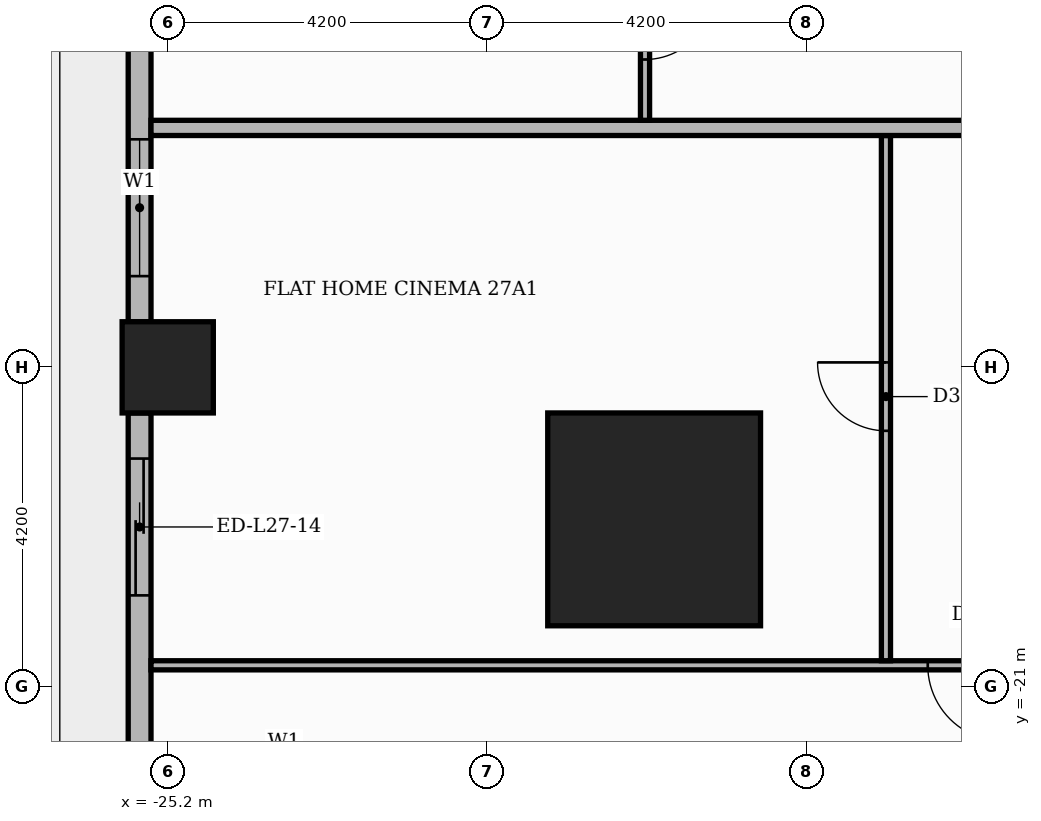
"""IFC4 building model, lengths in metres.
Left out: names, types, materials, properties, quantities, classifications, styles, units other than length and angle.
Written with IfcOpenShell. Run it as: python <this file> out.ifc"""

import sys

from ifc_helpers import new_model, si_unit, direction, frame, frame_2d, origin, origin_2d, place, context, subcontext, project, spatial, rectangle, extrude, element, fill, save


model = new_model("IFC4")
c1 = context("Model", 3, precision=1e-05, world=origin(), true_north=direction((0.0, 1.0)))
c2 = subcontext(c1, "Body", "Model", "MODEL_VIEW")
j1 = project(units=[si_unit("LENGTHUNIT", "METRE"), si_unit("PLANEANGLEUNIT", "RADIAN")], contexts=[c1])
p1 = place(None, origin())
s1 = spatial("IfcSite", under=j1, at=p1, CompositionType="ELEMENT")
p2 = place(p1, origin())
s2 = spatial("IfcBuilding", under=s1, at=p2, CompositionType="ELEMENT")
p3 = place(p2, frame((0.0, 0.0, 114.3)))
s3 = spatial("IfcBuildingStorey", under=s2, at=p3, CompositionType="ELEMENT", Elevation=114.3)
p4 = place(p3, frame((-18.8, -18.8, 0.0), z_axis=(0.0, 0.0, 1.0), x_axis=(1.0, 0.0, 0.0)))
e1 = element("IfcColumn", 1, at=p4, inside=s3, PredefinedType="COLUMN", context=c2, shape_type="SweptSolid", body=[
    extrude(rectangle(XDim=2.8, YDim=2.8, at=origin_2d()), origin(), (0.0, 0.0, 1.0), 3.9),
])
p5 = place(p3, frame((-25.2, -16.8, 0.0), z_axis=(0.0, 0.0, 1.0), x_axis=(1.0, 0.0, 0.0)))
e2 = element("IfcColumn", 2, at=p5, inside=s3, PredefinedType="COLUMN", context=c2, shape_type="SweptSolid", body=[
    extrude(rectangle(XDim=1.2, YDim=1.2, at=origin_2d()), origin(), (0.0, 0.0, 1.0), 3.9),
])
p6 = place(p3, frame((-25.57, -11.85, 0.0), z_axis=(0.0, 0.0, 1.0), x_axis=(0.0, -1.0, 0.0)))
e3 = element("IfcWall", 3, at=p6, inside=s3, PredefinedType="STANDARD", context=c2, shape_type="SweptSolid", body=[
    extrude(rectangle(XDim=4.35, YDim=0.3, at=frame_2d((2.175, 0.0))), origin(), (0.0, 0.0, 1.0), 3.48),
])
p7 = place(p6, frame((1.95, 0.0, 0.9)))
e4 = element("IfcOpeningElement", 4, at=p7, cuts=e3, PredefinedType="OPENING", context=c2, shape_type="SweptSolid", body=[
    extrude(rectangle(XDim=1.8, YDim=2.1, at=frame_2d((0.9, 1.05))), frame((0.0, 0.16, 0.0), z_axis=(0.0, -1.0, 0.0), x_axis=(1.0, 0.0, 0.0)), (0.0, 0.0, 1.0), 0.32),
])
p8 = place(p3, frame((-25.57, -17.4, 0.0), z_axis=(0.0, 0.0, 1.0), x_axis=(0.0, -1.0, 0.0)))
e5 = element("IfcWall", 5, at=p8, inside=s3, PredefinedType="STANDARD", context=c2, shape_type="SweptSolid", body=[
    extrude(rectangle(XDim=4.82, YDim=0.3, at=frame_2d((2.41, 0.0))), origin(), (0.0, 0.0, 1.0), 3.48),
])
p9 = place(p8, frame((0.6, 0.0, 0.0)))
e6 = element("IfcOpeningElement", 6, at=p9, cuts=e5, PredefinedType="OPENING", context=c2, shape_type="SweptSolid", body=[
    extrude(rectangle(XDim=1.8, YDim=2.4, at=frame_2d((0.9, 1.2))), frame((0.0, 0.16, 0.0), z_axis=(0.0, -1.0, 0.0), x_axis=(1.0, 0.0, 0.0)), (0.0, 0.0, 1.0), 0.32),
])
p10 = place(p3, frame((-25.42, -20.72, 0.0), z_axis=(0.0, 0.0, 1.0), x_axis=(1.0, 0.0, 0.0)))
e7 = element("IfcWall", 7, at=p10, inside=s3, PredefinedType="PARTITIONING", context=c2, shape_type="SweptSolid", body=[
    extrude(rectangle(XDim=38.97, YDim=0.12, at=frame_2d((19.485, 0.0))), origin(), (0.0, 0.0, 1.0), 3.48),
])
p11 = place(p10, frame((10.22, 0.0, 0.0)))
e8 = element("IfcOpeningElement", 8, at=p11, cuts=e7, PredefinedType="OPENING", context=c2, shape_type="SweptSolid", body=[
    extrude(rectangle(XDim=1.0, YDim=2.1, at=frame_2d((0.5, 1.05))), frame((0.0, 0.07, 0.0), z_axis=(0.0, -1.0, 0.0), x_axis=(1.0, 0.0, 0.0)), (0.0, 0.0, 1.0), 0.14),
])
p12 = place(p10, frame((14.47, 0.0, 0.0)))
e9 = element("IfcOpeningElement", 9, at=p12, cuts=e7, PredefinedType="OPENING", context=c2, shape_type="SweptSolid", body=[
    extrude(rectangle(XDim=0.9, YDim=2.1, at=frame_2d((0.45, 1.05))), frame((0.0, 0.07, 0.0), z_axis=(0.0, -1.0, 0.0), x_axis=(1.0, 0.0, 0.0)), (0.0, 0.0, 1.0), 0.14),
])
p13 = place(p10, frame((23.92, 0.0, 0.0)))
e10 = element("IfcOpeningElement", 10, at=p13, cuts=e7, PredefinedType="OPENING", context=c2, shape_type="SweptSolid", body=[
    extrude(rectangle(XDim=0.9, YDim=2.1, at=frame_2d((0.45, 1.05))), frame((0.0, 0.07, 0.0), z_axis=(0.0, -1.0, 0.0), x_axis=(1.0, 0.0, 0.0)), (0.0, 0.0, 1.0), 0.14),
])
p14 = place(p10, frame((28.12, 0.0, 0.0)))
e11 = element("IfcOpeningElement", 11, at=p14, cuts=e7, PredefinedType="OPENING", context=c2, shape_type="SweptSolid", body=[
    extrude(rectangle(XDim=0.9, YDim=2.1, at=frame_2d((0.45, 1.05))), frame((0.0, 0.07, 0.0), z_axis=(0.0, -1.0, 0.0), x_axis=(1.0, 0.0, 0.0)), (0.0, 0.0, 1.0), 0.14),
])
p15 = place(p10, frame((34.42, 0.0, 0.0)))
e12 = element("IfcOpeningElement", 12, at=p15, cuts=e7, PredefinedType="OPENING", context=c2, shape_type="SweptSolid", body=[
    extrude(rectangle(XDim=0.9, YDim=2.1, at=frame_2d((0.45, 1.05))), frame((0.0, 0.07, 0.0), z_axis=(0.0, -1.0, 0.0), x_axis=(1.0, 0.0, 0.0)), (0.0, 0.0, 1.0), 0.14),
])
p16 = place(p3, frame((-15.75, -20.66, 0.0), z_axis=(0.0, 0.0, 1.0), x_axis=(0.0, 1.0, 0.0)))
e13 = element("IfcWall", 13, at=p16, inside=s3, PredefinedType="PARTITIONING", context=c2, shape_type="SweptSolid", body=[
    extrude(rectangle(XDim=6.91, YDim=0.12, at=frame_2d((3.455, 0.0))), origin(), (0.0, 0.0, 1.0), 3.48),
])
p17 = place(p16, frame((3.025, 0.0, 0.0)))
e14 = element("IfcOpeningElement", 14, at=p17, cuts=e13, PredefinedType="OPENING", context=c2, shape_type="SweptSolid", body=[
    extrude(rectangle(XDim=0.9, YDim=2.1, at=frame_2d((0.45, 1.05))), frame((0.0, 0.07, 0.0), z_axis=(0.0, -1.0, 0.0), x_axis=(1.0, 0.0, 0.0)), (0.0, 0.0, 1.0), 0.14),
])
p18 = place(p3, frame((-25.42, -13.65, 0.0), z_axis=(0.0, 0.0, 1.0), x_axis=(1.0, 0.0, 0.0)))
e15 = element("IfcWall", 15, at=p18, inside=s3, PredefinedType="PARTITIONING", context=c2, shape_type="SweptSolid", body=[
    extrude(rectangle(XDim=39.07, YDim=0.2, at=frame_2d((19.535, 0.0))), origin(), (0.0, 0.0, 1.0), 3.48),
])
p19 = place(p18, frame((13.32, 0.0, 0.0)))
e16 = element("IfcOpeningElement", 16, at=p19, cuts=e15, PredefinedType="OPENING", context=c2, shape_type="SweptSolid", body=[
    extrude(rectangle(XDim=1.1, YDim=2.4, at=frame_2d((0.55, 1.2))), frame((0.0, 0.11, 0.0), z_axis=(0.0, -1.0, 0.0), x_axis=(1.0, 0.0, 0.0)), (0.0, 0.0, 1.0), 0.22),
])
p20 = place(p3, frame((-18.92, -13.55, 0.0), z_axis=(0.0, 0.0, 1.0), x_axis=(0.0, 1.0, 0.0)))
e17 = element("IfcWall", 17, at=p20, inside=s3, PredefinedType="PARTITIONING", context=c2, shape_type="SweptSolid", body=[
    extrude(rectangle(XDim=2.54, YDim=0.12, at=frame_2d((1.27, 0.0))), origin(), (0.0, 0.0, 1.0), 3.48),
])
p21 = place(p20, frame((0.8, 0.0, 0.0)))
e18 = element("IfcOpeningElement", 18, at=p21, cuts=e17, PredefinedType="OPENING", context=c2, shape_type="SweptSolid", body=[
    extrude(rectangle(XDim=0.9, YDim=2.1, at=frame_2d((0.45, 1.05))), frame((0.0, 0.07, 0.0), z_axis=(0.0, -1.0, 0.0), x_axis=(1.0, 0.0, 0.0)), (0.0, 0.0, 1.0), 0.14),
])
p22 = place(p7, origin())
e19 = element("IfcWindow", 19, at=p22, inside=s3, PartitioningType="SINGLE_PANEL", PredefinedType="WINDOW", context=c2, shape_type="SweptSolid", body=[
    extrude(rectangle(XDim=1.8, YDim=2.1, at=frame_2d((0.9, 1.05))), frame((0.0, 0.03, 0.0), z_axis=(0.0, -1.0, 0.0), x_axis=(1.0, 0.0, 0.0)), (0.0, 0.0, 1.0), 0.06),
])
fill(e4, e19)
p23 = place(p9, origin())
e20 = element("IfcDoor", 20, at=p23, inside=s3, OperationType="SLIDING_TO_LEFT", PredefinedType="DOOR", context=c2, shape_type="SweptSolid", body=[
    extrude(rectangle(XDim=1.8, YDim=2.4, at=frame_2d((0.9, 1.2))), frame((0.0, 0.025, 0.0), z_axis=(0.0, -1.0, 0.0), x_axis=(1.0, 0.0, 0.0)), (0.0, 0.0, 1.0), 0.05),
])
fill(e6, e20)
p24 = place(p17, origin())
e21 = element("IfcDoor", 21, at=p24, inside=s3, OperationType="SINGLE_SWING_RIGHT", PredefinedType="DOOR", context=c2, shape_type="SweptSolid", body=[
    extrude(rectangle(XDim=0.9, YDim=2.1, at=frame_2d((0.45, 1.05))), frame((0.0, 0.025, 0.0), z_axis=(0.0, -1.0, 0.0), x_axis=(1.0, 0.0, 0.0)), (0.0, 0.0, 1.0), 0.05),
])
fill(e14, e21)
p25 = place(p11, frame((1.0, 0.0, 0.0), z_axis=(0.0, 0.0, 1.0), x_axis=(-1.0, 0.0, 0.0)))
e22 = element("IfcDoor", 22, at=p25, inside=s3, OperationType="SINGLE_SWING_RIGHT", PredefinedType="DOOR", context=c2, shape_type="SweptSolid", body=[
    extrude(rectangle(XDim=1.0, YDim=2.1, at=frame_2d((0.5, 1.05))), frame((0.0, 0.025, 0.0), z_axis=(0.0, -1.0, 0.0), x_axis=(1.0, 0.0, 0.0)), (0.0, 0.0, 1.0), 0.05),
])
fill(e8, e22)
p26 = place(p21, frame((0.9, 0.0, 0.0), z_axis=(0.0, 0.0, 1.0), x_axis=(-1.0, 0.0, 0.0)))
e23 = element("IfcDoor", 23, at=p26, inside=s3, OperationType="SINGLE_SWING_RIGHT", PredefinedType="DOOR", context=c2, shape_type="SweptSolid", body=[
    extrude(rectangle(XDim=0.9, YDim=2.1, at=frame_2d((0.45, 1.05))), frame((0.0, 0.025, 0.0), z_axis=(0.0, -1.0, 0.0), x_axis=(1.0, 0.0, 0.0)), (0.0, 0.0, 1.0), 0.05),
])
fill(e18, e23)
save(model, sys.argv[1])
